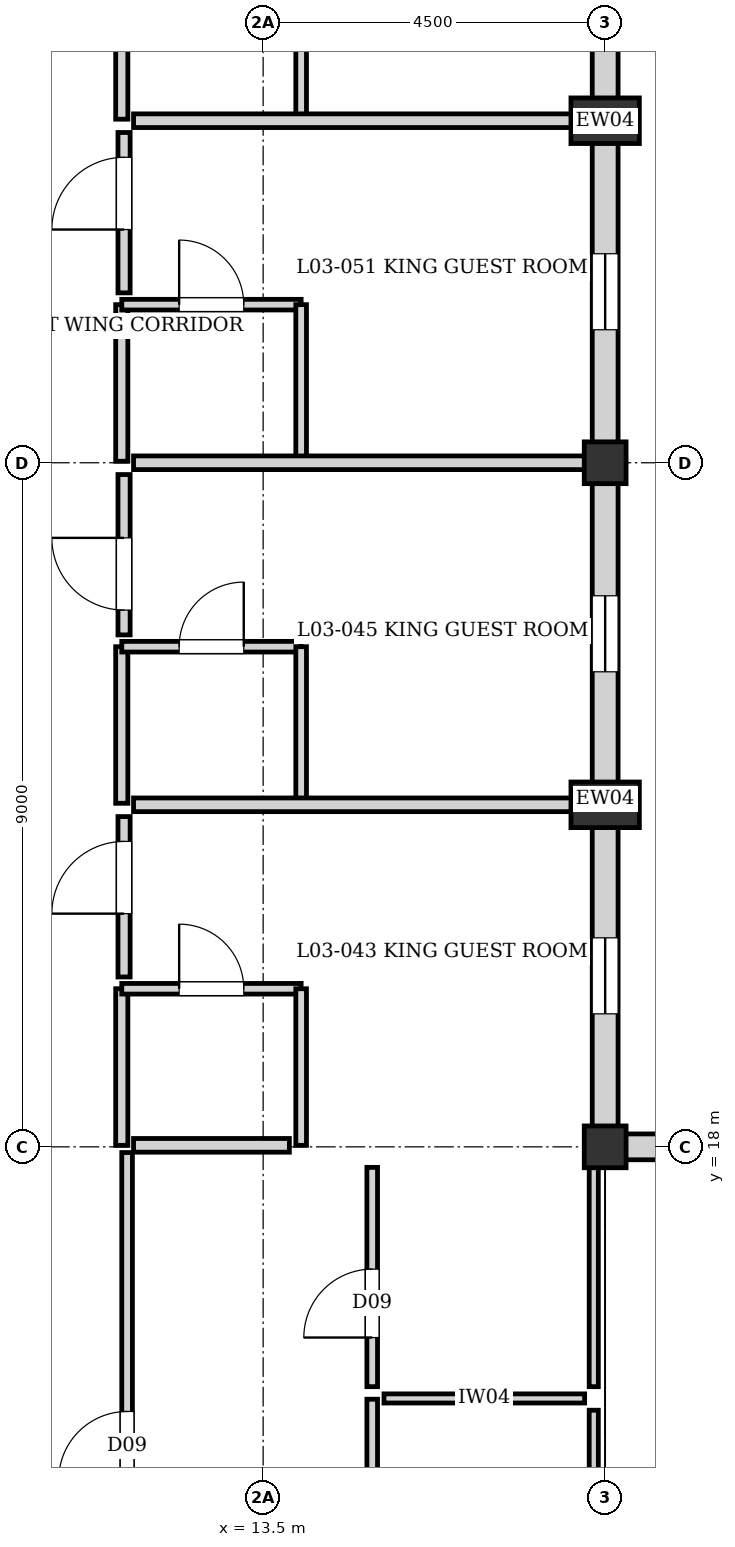
"""IFC4 building model, lengths in metres.
Left out: names, types, materials, properties, quantities, classifications, styles, units other than length and angle.
Written with IfcOpenShell. Run it as: python <this file> out.ifc"""

import sys

from ifc_helpers import new_model, si_unit, direction, frame, frame_2d, origin, origin_2d, place, context, subcontext, project, spatial, rectangle, extrude, element, fill, save


model = new_model("IFC4")
c1 = context("Model", 3, precision=1e-05, world=origin(), true_north=direction((0.0, 1.0)))
c2 = subcontext(c1, "Body", "Model", "MODEL_VIEW")
j1 = project(units=[si_unit("LENGTHUNIT", "METRE"), si_unit("PLANEANGLEUNIT", "RADIAN")], contexts=[c1])
p1 = place(None, origin())
s1 = spatial("IfcSite", under=j1, at=p1, CompositionType="ELEMENT")
p2 = place(p1, origin())
s2 = spatial("IfcBuilding", under=s1, at=p2, CompositionType="ELEMENT")
p3 = place(p2, frame((0.0, 0.0, 11.52)))
s3 = spatial("IfcBuildingStorey", under=s2, at=p3, CompositionType="ELEMENT", Elevation=11.52)
for number, where, z_axis, x_axis in (
    (1, (18.0, 18.0, 0.0), (0.0, 0.0, 1.0), (1.0, 0.0, 0.0)),
    (2, (18.0, 27.0, 0.0), (0.0, 0.0, 1.0), (1.0, 0.0, 0.0)),
):
    element("IfcColumn", number, at=place(p3, frame(where, z_axis=z_axis, x_axis=x_axis)), inside=s3, PredefinedType="COLUMN", context=c2, shape_type="SweptSolid", body=[
        extrude(rectangle(XDim=0.55, YDim=0.55, at=origin_2d()), origin(), (0.0, 0.0, 1.0), 3.04),
    ])
for number, where, z_axis, x_axis in (
    (3, (18.0, 22.5, 0.0), (0.0, 0.0, 1.0), (0.0, 1.0, 0.0)),
    (4, (18.0, 31.5, 0.0), (0.0, 0.0, 1.0), (0.0, 1.0, 0.0)),
):
    element("IfcColumn", number, at=place(p3, frame(where, z_axis=z_axis, x_axis=x_axis)), inside=s3, PredefinedType="PILASTER", context=c2, shape_type="SweptSolid", body=[
        extrude(rectangle(XDim=0.6, YDim=0.9, at=origin_2d()), origin(), (0.0, 0.0, 1.0), 3.04),
    ])
p4 = place(p3, frame((18.0, 36.0, 0.0), z_axis=(0.0, 0.0, 1.0), x_axis=(0.0, -1.0, 0.0)))
e5 = element("IfcWall", 5, at=p4, inside=s3, PredefinedType="SOLIDWALL", context=c2, shape_type="SweptSolid", body=[
    extrude(rectangle(XDim=9.0, YDim=0.34, at=frame_2d((4.5, 0.0))), origin(), (0.0, 0.0, 1.0), 2.48),
])
p5 = place(p4, frame((1.75, 0.0, 0.35)))
e6 = element("IfcOpeningElement", 6, at=p5, cuts=e5, PredefinedType="OPENING", context=c2, shape_type="SweptSolid", body=[
    extrude(rectangle(XDim=1.0, YDim=1.6, at=frame_2d((0.5, 0.8))), frame((0.0, 0.18, 0.0), z_axis=(0.0, -1.0, 0.0), x_axis=(1.0, 0.0, 0.0)), (0.0, 0.0, 1.0), 0.36),
])
p6 = place(p4, frame((6.25, 0.0, 0.35)))
e7 = element("IfcOpeningElement", 7, at=p6, cuts=e5, PredefinedType="OPENING", context=c2, shape_type="SweptSolid", body=[
    extrude(rectangle(XDim=1.0, YDim=1.6, at=frame_2d((0.5, 0.8))), frame((0.0, 0.18, 0.0), z_axis=(0.0, -1.0, 0.0), x_axis=(1.0, 0.0, 0.0)), (0.0, 0.0, 1.0), 0.36),
])
p7 = place(p3, frame((18.0, 27.0, 0.0), z_axis=(0.0, 0.0, 1.0), x_axis=(0.0, -1.0, 0.0)))
e8 = element("IfcWall", 8, at=p7, inside=s3, PredefinedType="SOLIDWALL", context=c2, shape_type="SweptSolid", body=[
    extrude(rectangle(XDim=8.845, YDim=0.34, at=frame_2d((4.422, 0.0))), origin(), (0.0, 0.0, 1.0), 2.82),
])
p8 = place(p7, frame((1.75, 0.0, 0.35)))
e9 = element("IfcOpeningElement", 9, at=p8, cuts=e8, PredefinedType="OPENING", context=c2, shape_type="SweptSolid", body=[
    extrude(rectangle(XDim=1.0, YDim=1.6, at=frame_2d((0.5, 0.8))), frame((0.0, 0.18, 0.0), z_axis=(0.0, -1.0, 0.0), x_axis=(1.0, 0.0, 0.0)), (0.0, 0.0, 1.0), 0.36),
])
p9 = place(p7, frame((6.25, 0.0, 0.35)))
e10 = element("IfcOpeningElement", 10, at=p9, cuts=e8, PredefinedType="OPENING", context=c2, shape_type="SweptSolid", body=[
    extrude(rectangle(XDim=1.0, YDim=1.6, at=frame_2d((0.5, 0.8))), frame((0.0, 0.18, 0.0), z_axis=(0.0, -1.0, 0.0), x_axis=(1.0, 0.0, 0.0)), (0.0, 0.0, 1.0), 0.36),
])
p10 = place(p3, frame((18.0, 18.0, 0.0), z_axis=(0.0, 0.0, 1.0), x_axis=(1.0, 0.0, 0.0)))
e11 = element("IfcWall", 11, at=p10, inside=s3, PredefinedType="SOLIDWALL", context=c2, shape_type="SweptSolid", body=[
    extrude(rectangle(XDim=9.0, YDim=0.34, at=frame_2d((4.5, 0.0))), origin(), (0.0, 0.0, 1.0), 2.38),
])
p11 = place(p10, frame((1.75, 0.0, 0.35)))
e12 = element("IfcOpeningElement", 12, at=p11, cuts=e11, PredefinedType="OPENING", context=c2, shape_type="SweptSolid", body=[
    extrude(rectangle(XDim=1.0, YDim=1.6, at=frame_2d((0.5, 0.8))), frame((0.0, 0.18, 0.0), z_axis=(0.0, -1.0, 0.0), x_axis=(1.0, 0.0, 0.0)), (0.0, 0.0, 1.0), 0.36),
])
p12 = place(p10, frame((6.25, 0.0, 0.35)))
e13 = element("IfcOpeningElement", 13, at=p12, cuts=e11, PredefinedType="OPENING", context=c2, shape_type="SweptSolid", body=[
    extrude(rectangle(XDim=1.0, YDim=1.6, at=frame_2d((0.5, 0.8))), frame((0.0, 0.18, 0.0), z_axis=(0.0, -1.0, 0.0), x_axis=(1.0, 0.0, 0.0)), (0.0, 0.0, 1.0), 0.36),
])
p13 = place(p3, frame((11.64, 18.02, 0.0), z_axis=(0.0, 0.0, 1.0), x_axis=(0.0, 1.0, 0.0)))
e14 = element("IfcWall", 14, at=p13, inside=s3, PredefinedType="PARTITIONING", context=c2, shape_type="SweptSolid", body=[
    extrude(rectangle(XDim=2.06, YDim=0.16, at=frame_2d((1.03, 0.0))), origin(), (0.0, 0.0, 1.0), 2.82),
])
p14 = place(p3, frame((11.64, 20.08, 0.0), z_axis=(0.0, 0.0, 1.0), x_axis=(1.0, 0.0, 0.0)))
e15 = element("IfcWall", 15, at=p14, inside=s3, PredefinedType="PLUMBINGWALL", context=c2, shape_type="SweptSolid", body=[
    extrude(rectangle(XDim=2.36, YDim=0.14, at=frame_2d((1.18, 0.0))), origin(), (0.0, 0.0, 1.0), 2.82),
])
p15 = place(p14, frame((0.755, 0.0, 0.0)))
e16 = element("IfcOpeningElement", 16, at=p15, cuts=e15, PredefinedType="OPENING", context=c2, shape_type="SweptSolid", body=[
    extrude(rectangle(XDim=0.85, YDim=2.04, at=frame_2d((0.425, 1.02))), frame((0.0, 0.08, 0.0), z_axis=(0.0, -1.0, 0.0), x_axis=(1.0, 0.0, 0.0)), (0.0, 0.0, 1.0), 0.16),
])
p16 = place(p3, frame((14.0, 18.02, 0.0), z_axis=(0.0, 0.0, 1.0), x_axis=(0.0, 1.0, 0.0)))
e17 = element("IfcWall", 17, at=p16, inside=s3, PredefinedType="PLUMBINGWALL", context=c2, shape_type="SweptSolid", body=[
    extrude(rectangle(XDim=2.06, YDim=0.14, at=frame_2d((1.03, 0.0))), origin(), (0.0, 0.0, 1.0), 2.82),
])
p17 = place(p3, frame((11.64, 22.52, 0.0), z_axis=(0.0, 0.0, 1.0), x_axis=(0.0, 1.0, 0.0)))
e18 = element("IfcWall", 18, at=p17, inside=s3, PredefinedType="PARTITIONING", context=c2, shape_type="SweptSolid", body=[
    extrude(rectangle(XDim=2.06, YDim=0.16, at=frame_2d((1.03, 0.0))), origin(), (0.0, 0.0, 1.0), 2.82),
])
p18 = place(p3, frame((11.64, 24.58, 0.0), z_axis=(0.0, 0.0, 1.0), x_axis=(1.0, 0.0, 0.0)))
e19 = element("IfcWall", 19, at=p18, inside=s3, PredefinedType="PLUMBINGWALL", context=c2, shape_type="SweptSolid", body=[
    extrude(rectangle(XDim=2.36, YDim=0.14, at=frame_2d((1.18, 0.0))), origin(), (0.0, 0.0, 1.0), 2.82),
])
p19 = place(p18, frame((0.755, 0.0, 0.0)))
e20 = element("IfcOpeningElement", 20, at=p19, cuts=e19, PredefinedType="OPENING", context=c2, shape_type="SweptSolid", body=[
    extrude(rectangle(XDim=0.85, YDim=2.04, at=frame_2d((0.425, 1.02))), frame((0.0, 0.08, 0.0), z_axis=(0.0, -1.0, 0.0), x_axis=(1.0, 0.0, 0.0)), (0.0, 0.0, 1.0), 0.16),
])
p20 = place(p3, frame((14.0, 22.52, 0.0), z_axis=(0.0, 0.0, 1.0), x_axis=(0.0, 1.0, 0.0)))
e21 = element("IfcWall", 21, at=p20, inside=s3, PredefinedType="PLUMBINGWALL", context=c2, shape_type="SweptSolid", body=[
    extrude(rectangle(XDim=2.06, YDim=0.14, at=frame_2d((1.03, 0.0))), origin(), (0.0, 0.0, 1.0), 2.82),
])
p21 = place(p3, frame((11.64, 27.02, 0.0), z_axis=(0.0, 0.0, 1.0), x_axis=(0.0, 1.0, 0.0)))
e22 = element("IfcWall", 22, at=p21, inside=s3, PredefinedType="PARTITIONING", context=c2, shape_type="SweptSolid", body=[
    extrude(rectangle(XDim=2.06, YDim=0.16, at=frame_2d((1.03, 0.0))), origin(), (0.0, 0.0, 1.0), 2.82),
])
p22 = place(p3, frame((11.64, 29.08, 0.0), z_axis=(0.0, 0.0, 1.0), x_axis=(1.0, 0.0, 0.0)))
e23 = element("IfcWall", 23, at=p22, inside=s3, PredefinedType="PLUMBINGWALL", context=c2, shape_type="SweptSolid", body=[
    extrude(rectangle(XDim=2.36, YDim=0.14, at=frame_2d((1.18, 0.0))), origin(), (0.0, 0.0, 1.0), 2.82),
])
p23 = place(p22, frame((0.755, 0.0, 0.0)))
e24 = element("IfcOpeningElement", 24, at=p23, cuts=e23, PredefinedType="OPENING", context=c2, shape_type="SweptSolid", body=[
    extrude(rectangle(XDim=0.85, YDim=2.04, at=frame_2d((0.425, 1.02))), frame((0.0, 0.08, 0.0), z_axis=(0.0, -1.0, 0.0), x_axis=(1.0, 0.0, 0.0)), (0.0, 0.0, 1.0), 0.16),
])
p24 = place(p3, frame((14.0, 27.02, 0.0), z_axis=(0.0, 0.0, 1.0), x_axis=(0.0, 1.0, 0.0)))
e25 = element("IfcWall", 25, at=p24, inside=s3, PredefinedType="PLUMBINGWALL", context=c2, shape_type="SweptSolid", body=[
    extrude(rectangle(XDim=2.06, YDim=0.14, at=frame_2d((1.03, 0.0))), origin(), (0.0, 0.0, 1.0), 2.82),
])
p25 = place(p3, frame((11.64, 31.52, 0.0), z_axis=(0.0, 0.0, 1.0), x_axis=(0.0, 1.0, 0.0)))
e26 = element("IfcWall", 26, at=p25, inside=s3, PredefinedType="PARTITIONING", context=c2, shape_type="SweptSolid", body=[
    extrude(rectangle(XDim=2.06, YDim=0.16, at=frame_2d((1.03, 0.0))), origin(), (0.0, 0.0, 1.0), 2.82),
])
p26 = place(p3, frame((14.0, 31.52, 0.0), z_axis=(0.0, 0.0, 1.0), x_axis=(0.0, 1.0, 0.0)))
e27 = element("IfcWall", 27, at=p26, inside=s3, PredefinedType="PLUMBINGWALL", context=c2, shape_type="SweptSolid", body=[
    extrude(rectangle(XDim=2.06, YDim=0.14, at=frame_2d((1.03, 0.0))), origin(), (0.0, 0.0, 1.0), 2.82),
])
p27 = place(p3, frame((11.795, 22.5, 0.0), z_axis=(0.0, 0.0, 1.0), x_axis=(1.0, 0.0, 0.0)))
e28 = element("IfcWall", 28, at=p27, inside=s3, PredefinedType="PARTITIONING", context=c2, shape_type="SweptSolid", body=[
    extrude(rectangle(XDim=6.03, YDim=0.18, at=frame_2d((3.015, 0.0))), origin(), (0.0, 0.0, 1.0), 2.82),
])
p28 = place(p3, frame((11.795, 27.0, 0.0), z_axis=(0.0, 0.0, 1.0), x_axis=(1.0, 0.0, 0.0)))
e29 = element("IfcWall", 29, at=p28, inside=s3, PredefinedType="PARTITIONING", context=c2, shape_type="SweptSolid", body=[
    extrude(rectangle(XDim=6.03, YDim=0.18, at=frame_2d((3.015, 0.0))), origin(), (0.0, 0.0, 1.0), 2.39),
])
p29 = place(p3, frame((11.795, 31.5, 0.0), z_axis=(0.0, 0.0, 1.0), x_axis=(1.0, 0.0, 0.0)))
e30 = element("IfcWall", 30, at=p29, inside=s3, PredefinedType="PARTITIONING", context=c2, shape_type="SweptSolid", body=[
    extrude(rectangle(XDim=6.03, YDim=0.18, at=frame_2d((3.015, 0.0))), origin(), (0.0, 0.0, 1.0), 2.82),
])
p30 = place(p3, frame((11.795, 18.02, 0.0), z_axis=(0.0, 0.0, 1.0), x_axis=(1.0, 0.0, 0.0)))
e31 = element("IfcWall", 31, at=p30, inside=s3, PredefinedType="PARTITIONING", context=c2, shape_type="SweptSolid", body=[
    extrude(rectangle(XDim=2.05, YDim=0.18, at=frame_2d((1.025, 0.0))), origin(), (0.0, 0.0, 1.0), 2.42),
])
p31 = place(p3, frame((14.935, 11.79, 0.0), z_axis=(0.0, 0.0, 1.0), x_axis=(0.0, 1.0, 0.0)))
e32 = element("IfcWall", 32, at=p31, inside=s3, PredefinedType="PLUMBINGWALL", context=c2, shape_type="SweptSolid", body=[
    extrude(rectangle(XDim=2.89, YDim=0.14, at=frame_2d((1.445, 0.0))), origin(), (0.0, 0.0, 1.0), 2.82),
])
p32 = place(p3, frame((15.09, 14.69, 0.0), z_axis=(0.0, 0.0, 1.0), x_axis=(1.0, 0.0, 0.0)))
e33 = element("IfcWall", 33, at=p32, inside=s3, PredefinedType="PARTITIONING", context=c2, shape_type="SweptSolid", body=[
    extrude(rectangle(XDim=2.64, YDim=0.12, at=frame_2d((1.32, 0.0))), origin(), (0.0, 0.0, 1.0), 2.82),
])
p33 = place(p3, frame((17.85, 11.64, 0.0), z_axis=(0.0, 0.0, 1.0), x_axis=(0.0, 1.0, 0.0)))
e34 = element("IfcWall", 34, at=p33, inside=s3, PredefinedType="PARTITIONING", context=c2, shape_type="SweptSolid", body=[
    extrude(rectangle(XDim=2.895, YDim=0.12, at=frame_2d((1.448, 0.0))), origin(), (0.0, 0.0, 1.0), 2.38),
])
p34 = place(p3, frame((17.85, 14.845, 0.0), z_axis=(0.0, 0.0, 1.0), x_axis=(0.0, 1.0, 0.0)))
e35 = element("IfcWall", 35, at=p34, inside=s3, PredefinedType="PARTITIONING", context=c2, shape_type="SweptSolid", body=[
    extrude(rectangle(XDim=2.98, YDim=0.12, at=frame_2d((1.49, 0.0))), origin(), (0.0, 0.0, 1.0), 2.38),
])
p35 = place(p3, frame((11.71, 11.705, 0.0), z_axis=(0.0, 0.0, 1.0), x_axis=(0.0, 1.0, 0.0)))
e36 = element("IfcWall", 36, at=p35, inside=s3, PredefinedType="PLUMBINGWALL", context=c2, shape_type="SweptSolid", body=[
    extrude(rectangle(XDim=6.22, YDim=0.14, at=frame_2d((3.11, 0.0))), origin(), (0.0, 0.0, 1.0), 2.82),
])
p36 = place(p35, frame((1.914, 0.0, 0.0)))
e37 = element("IfcOpeningElement", 37, at=p36, cuts=e36, PredefinedType="OPENING", context=c2, shape_type="SweptSolid", body=[
    extrude(rectangle(XDim=0.9, YDim=2.1, at=frame_2d((0.45, 1.05))), frame((0.0, 0.08, 0.0), z_axis=(0.0, -1.0, 0.0), x_axis=(1.0, 0.0, 0.0)), (0.0, 0.0, 1.0), 0.16),
])
p37 = place(p3, frame((11.67, 20.235, 0.0), z_axis=(0.0, 0.0, 1.0), x_axis=(0.0, 1.0, 0.0)))
e38 = element("IfcWall", 38, at=p37, inside=s3, PredefinedType="PARTITIONING", context=c2, shape_type="SweptSolid", body=[
    extrude(rectangle(XDim=2.11, YDim=0.16, at=frame_2d((1.055, 0.0))), origin(), (0.0, 0.0, 1.0), 2.82),
])
p38 = place(p37, frame((0.833, 0.0, 0.0)))
e39 = element("IfcOpeningElement", 39, at=p38, cuts=e38, PredefinedType="OPENING", context=c2, shape_type="SweptSolid", body=[
    extrude(rectangle(XDim=0.95, YDim=2.15, at=frame_2d((0.475, 1.075))), frame((0.0, 0.09, 0.0), z_axis=(0.0, -1.0, 0.0), x_axis=(1.0, 0.0, 0.0)), (0.0, 0.0, 1.0), 0.18),
])
p39 = place(p3, frame((11.67, 24.735, 0.0), z_axis=(0.0, 0.0, 1.0), x_axis=(0.0, 1.0, 0.0)))
e40 = element("IfcWall", 40, at=p39, inside=s3, PredefinedType="PARTITIONING", context=c2, shape_type="SweptSolid", body=[
    extrude(rectangle(XDim=2.11, YDim=0.16, at=frame_2d((1.055, 0.0))), origin(), (0.0, 0.0, 1.0), 2.82),
])
p40 = place(p39, frame((0.327, 0.0, 0.0)))
e41 = element("IfcOpeningElement", 41, at=p40, cuts=e40, PredefinedType="OPENING", context=c2, shape_type="SweptSolid", body=[
    extrude(rectangle(XDim=0.95, YDim=2.15, at=frame_2d((0.475, 1.075))), frame((0.0, 0.09, 0.0), z_axis=(0.0, -1.0, 0.0), x_axis=(1.0, 0.0, 0.0)), (0.0, 0.0, 1.0), 0.18),
])
p41 = place(p3, frame((11.67, 29.235, 0.0), z_axis=(0.0, 0.0, 1.0), x_axis=(0.0, 1.0, 0.0)))
e42 = element("IfcWall", 42, at=p41, inside=s3, PredefinedType="PARTITIONING", context=c2, shape_type="SweptSolid", body=[
    extrude(rectangle(XDim=2.11, YDim=0.16, at=frame_2d((1.055, 0.0))), origin(), (0.0, 0.0, 1.0), 2.82),
])
p42 = place(p41, frame((0.833, 0.0, 0.0)))
e43 = element("IfcOpeningElement", 43, at=p42, cuts=e42, PredefinedType="OPENING", context=c2, shape_type="SweptSolid", body=[
    extrude(rectangle(XDim=0.95, YDim=2.15, at=frame_2d((0.475, 1.075))), frame((0.0, 0.09, 0.0), z_axis=(0.0, -1.0, 0.0), x_axis=(1.0, 0.0, 0.0)), (0.0, 0.0, 1.0), 0.18),
])
p43 = place(p3, frame((14.935, 14.845, 0.0), z_axis=(0.0, 0.0, 1.0), x_axis=(0.0, 1.0, 0.0)))
e44 = element("IfcWall", 44, at=p43, inside=s3, PredefinedType="PLUMBINGWALL", context=c2, shape_type="SweptSolid", body=[
    extrude(rectangle(XDim=2.885, YDim=0.14, at=frame_2d((1.442, 0.0))), origin(), (0.0, 0.0, 1.0), 2.82),
])
p44 = place(p43, frame((0.646, 0.0, 0.0)))
e45 = element("IfcOpeningElement", 45, at=p44, cuts=e44, PredefinedType="OPENING", context=c2, shape_type="SweptSolid", body=[
    extrude(rectangle(XDim=0.9, YDim=2.1, at=frame_2d((0.45, 1.05))), frame((0.0, 0.08, 0.0), z_axis=(0.0, -1.0, 0.0), x_axis=(1.0, 0.0, 0.0)), (0.0, 0.0, 1.0), 0.16),
])
p45 = place(p6, origin())
e46 = element("IfcWindow", 46, at=p45, inside=s3, PartitioningType="SINGLE_PANEL", PredefinedType="WINDOW", context=c2, shape_type="SweptSolid", body=[
    extrude(rectangle(XDim=1.0, YDim=1.6, at=frame_2d((0.5, 0.8))), frame((0.0, 0.03, 0.0), z_axis=(0.0, -1.0, 0.0), x_axis=(1.0, 0.0, 0.0)), (0.0, 0.0, 1.0), 0.06),
])
fill(e7, e46)
p46 = place(p8, origin())
e47 = element("IfcWindow", 47, at=p46, inside=s3, PartitioningType="SINGLE_PANEL", PredefinedType="WINDOW", context=c2, shape_type="SweptSolid", body=[
    extrude(rectangle(XDim=1.0, YDim=1.6, at=frame_2d((0.5, 0.8))), frame((0.0, 0.03, 0.0), z_axis=(0.0, -1.0, 0.0), x_axis=(1.0, 0.0, 0.0)), (0.0, 0.0, 1.0), 0.06),
])
fill(e9, e47)
p47 = place(p9, origin())
e48 = element("IfcWindow", 48, at=p47, inside=s3, PartitioningType="SINGLE_PANEL", PredefinedType="WINDOW", context=c2, shape_type="SweptSolid", body=[
    extrude(rectangle(XDim=1.0, YDim=1.6, at=frame_2d((0.5, 0.8))), frame((0.0, 0.03, 0.0), z_axis=(0.0, -1.0, 0.0), x_axis=(1.0, 0.0, 0.0)), (0.0, 0.0, 1.0), 0.06),
])
fill(e10, e48)
p48 = place(p15, origin())
e49 = element("IfcDoor", 49, at=p48, inside=s3, OperationType="SINGLE_SWING_LEFT", PredefinedType="DOOR", context=c2, shape_type="SweptSolid", body=[
    extrude(rectangle(XDim=0.85, YDim=2.04, at=frame_2d((0.425, 1.02))), frame((0.0, 0.025, 0.0), z_axis=(0.0, -1.0, 0.0), x_axis=(1.0, 0.0, 0.0)), (0.0, 0.0, 1.0), 0.05),
])
fill(e16, e49)
p49 = place(p19, origin())
e50 = element("IfcDoor", 50, at=p49, inside=s3, OperationType="SINGLE_SWING_RIGHT", PredefinedType="DOOR", context=c2, shape_type="SweptSolid", body=[
    extrude(rectangle(XDim=0.85, YDim=2.04, at=frame_2d((0.425, 1.02))), frame((0.0, 0.025, 0.0), z_axis=(0.0, -1.0, 0.0), x_axis=(1.0, 0.0, 0.0)), (0.0, 0.0, 1.0), 0.05),
])
fill(e20, e50)
p50 = place(p23, origin())
e51 = element("IfcDoor", 51, at=p50, inside=s3, OperationType="SINGLE_SWING_LEFT", PredefinedType="DOOR", context=c2, shape_type="SweptSolid", body=[
    extrude(rectangle(XDim=0.85, YDim=2.04, at=frame_2d((0.425, 1.02))), frame((0.0, 0.025, 0.0), z_axis=(0.0, -1.0, 0.0), x_axis=(1.0, 0.0, 0.0)), (0.0, 0.0, 1.0), 0.05),
])
fill(e24, e51)
p51 = place(p36, origin())
e52 = element("IfcDoor", 52, at=p51, inside=s3, OperationType="SINGLE_SWING_LEFT", PredefinedType="DOOR", context=c2, shape_type="SweptSolid", body=[
    extrude(rectangle(XDim=0.9, YDim=2.1, at=frame_2d((0.45, 1.05))), frame((0.0, 0.025, 0.0), z_axis=(0.0, -1.0, 0.0), x_axis=(1.0, 0.0, 0.0)), (0.0, 0.0, 1.0), 0.05),
])
fill(e37, e52)
p52 = place(p38, origin())
e53 = element("IfcDoor", 53, at=p52, inside=s3, OperationType="SINGLE_SWING_LEFT", PredefinedType="DOOR", context=c2, shape_type="SweptSolid", body=[
    extrude(rectangle(XDim=0.95, YDim=2.15, at=frame_2d((0.475, 1.075))), frame((0.0, 0.025, 0.0), z_axis=(0.0, -1.0, 0.0), x_axis=(1.0, 0.0, 0.0)), (0.0, 0.0, 1.0), 0.05),
])
fill(e39, e53)
p53 = place(p40, origin())
e54 = element("IfcDoor", 54, at=p53, inside=s3, OperationType="SINGLE_SWING_RIGHT", PredefinedType="DOOR", context=c2, shape_type="SweptSolid", body=[
    extrude(rectangle(XDim=0.95, YDim=2.15, at=frame_2d((0.475, 1.075))), frame((0.0, 0.025, 0.0), z_axis=(0.0, -1.0, 0.0), x_axis=(1.0, 0.0, 0.0)), (0.0, 0.0, 1.0), 0.05),
])
fill(e41, e54)
p54 = place(p42, origin())
e55 = element("IfcDoor", 55, at=p54, inside=s3, OperationType="SINGLE_SWING_LEFT", PredefinedType="DOOR", context=c2, shape_type="SweptSolid", body=[
    extrude(rectangle(XDim=0.95, YDim=2.15, at=frame_2d((0.475, 1.075))), frame((0.0, 0.025, 0.0), z_axis=(0.0, -1.0, 0.0), x_axis=(1.0, 0.0, 0.0)), (0.0, 0.0, 1.0), 0.05),
])
fill(e43, e55)
p55 = place(p44, origin())
e56 = element("IfcDoor", 56, at=p55, inside=s3, OperationType="SINGLE_SWING_LEFT", PredefinedType="DOOR", context=c2, shape_type="SweptSolid", body=[
    extrude(rectangle(XDim=0.9, YDim=2.1, at=frame_2d((0.45, 1.05))), frame((0.0, 0.025, 0.0), z_axis=(0.0, -1.0, 0.0), x_axis=(1.0, 0.0, 0.0)), (0.0, 0.0, 1.0), 0.05),
])
fill(e45, e56)
save(model, sys.argv[1])
